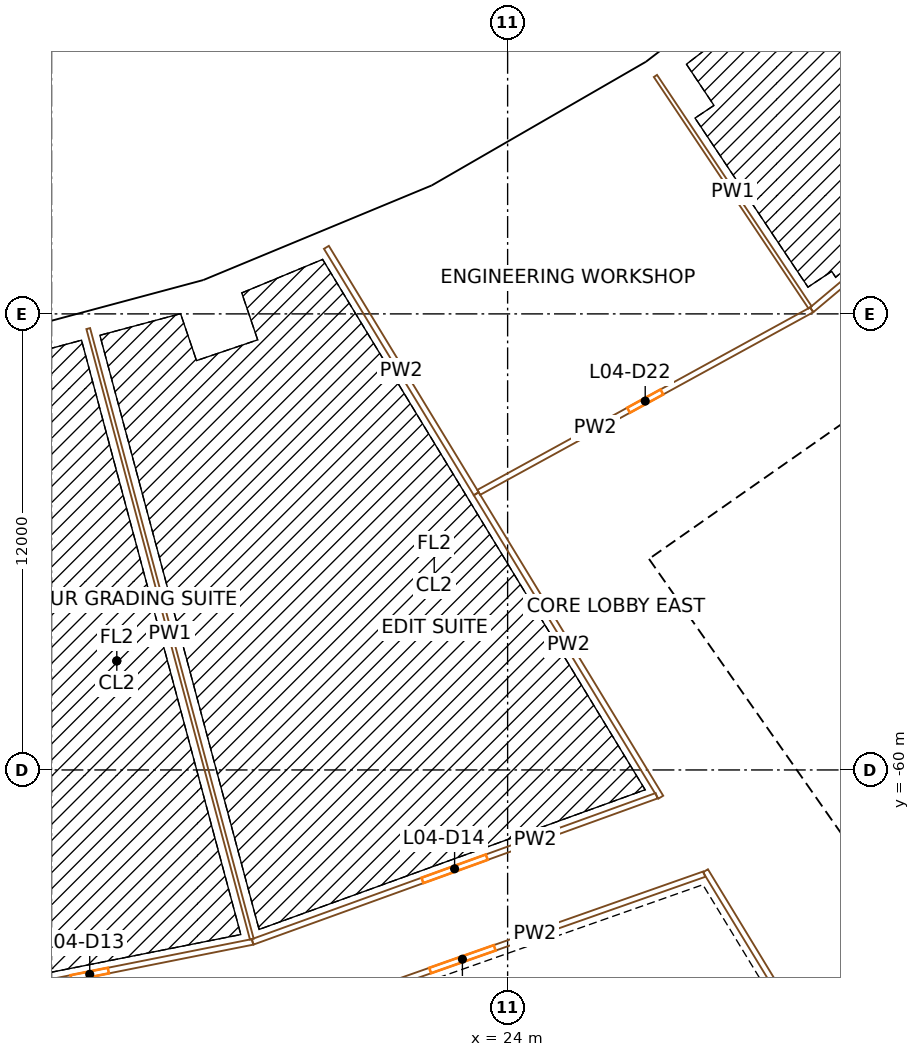
"""IFC4 building model, lengths in metres.
Left out: names, types, materials, properties, quantities, classifications, styles, units other than length and angle.
Written with IfcOpenShell. Run it as: python <this file> out.ifc"""

import sys

from ifc_helpers import new_model, si_unit, direction, frame, frame_2d, origin, origin_2d, place, context, subcontext, project, spatial, rectangle, extrude, element, fill, save


model = new_model("IFC4")
c1 = context("Model", 3, precision=1e-05, world=origin(), true_north=direction((0.0, 1.0)))
c2 = subcontext(c1, "Body", "Model", "MODEL_VIEW")
j1 = project(units=[si_unit("LENGTHUNIT", "METRE"), si_unit("PLANEANGLEUNIT", "RADIAN")], contexts=[c1])
p1 = place(None, origin())
s1 = spatial("IfcSite", under=j1, at=p1, CompositionType="ELEMENT")
p2 = place(p1, origin())
s2 = spatial("IfcBuilding", under=s1, at=p2, CompositionType="ELEMENT")
p3 = place(p2, frame((0.0, 0.0, 31.5)))
s3 = spatial("IfcBuildingStorey", under=s2, at=p3, CompositionType="ELEMENT", Elevation=31.5)
p4 = place(p3, frame((11.364, -57.131, 0.0), z_axis=(0.0, 0.0, 1.0), x_axis=(0.980785280403, 0.195090322016, 0.0)))
e1 = element("IfcColumn", 1, at=p4, inside=s3, PredefinedType="COLUMN", context=c2, shape_type="SweptSolid", body=[
    extrude(rectangle(XDim=1.4, YDim=1.8, at=origin_2d()), origin(), (0.0, 0.0, 1.0), 4.5),
])
p5 = place(p3, frame((16.313, -48.057, 0.0), z_axis=(0.0, 0.0, 1.0), x_axis=(0.946930129495, 0.321439465303, 0.0)))
e2 = element("IfcColumn", 2, at=p5, inside=s3, PredefinedType="COLUMN", context=c2, shape_type="SweptSolid", body=[
    extrude(rectangle(XDim=1.1, YDim=1.3, at=origin_2d()), origin(), (0.0, 0.0, 1.0), 4.5),
])
p6 = place(p3, frame((18.724, -55.159, 0.0), z_axis=(0.0, 0.0, 1.0), x_axis=(0.946930129495, 0.321439465303, 0.0)))
e3 = element("IfcColumn", 3, at=p6, inside=s3, PredefinedType="COLUMN", context=c2, shape_type="SweptSolid", body=[
    extrude(rectangle(XDim=1.4, YDim=1.8, at=origin_2d()), origin(), (0.0, 0.0, 1.0), 4.5),
])
p7 = place(p3, frame((22.446, -45.516, 0.0), z_axis=(0.0, 0.0, 1.0), x_axis=(0.896872741533, 0.442288690219, 0.0)))
e4 = element("IfcColumn", 4, at=p7, inside=s3, PredefinedType="COLUMN", context=c2, shape_type="SweptSolid", body=[
    extrude(rectangle(XDim=1.1, YDim=1.3, at=origin_2d()), origin(), (0.0, 0.0, 1.0), 4.5),
])
p8 = place(p3, frame((25.763, -52.243, 0.0), z_axis=(0.0, 0.0, 1.0), x_axis=(0.896872741533, 0.442288690219, 0.0)))
e5 = element("IfcColumn", 5, at=p8, inside=s3, PredefinedType="COLUMN", context=c2, shape_type="SweptSolid", body=[
    extrude(rectangle(XDim=1.4, YDim=1.8, at=origin_2d()), origin(), (0.0, 0.0, 1.0), 4.5),
])
p9 = place(p3, frame((28.195, -42.197, 0.0), z_axis=(0.0, 0.0, 1.0), x_axis=(0.831469612303, 0.55557023302, 0.0)))
e6 = element("IfcColumn", 6, at=p9, inside=s3, PredefinedType="COLUMN", context=c2, shape_type="SweptSolid", body=[
    extrude(rectangle(XDim=1.1, YDim=1.3, at=origin_2d()), origin(), (0.0, 0.0, 1.0), 4.5),
])
p10 = place(p3, frame((32.362, -48.433, 0.0), z_axis=(0.0, 0.0, 1.0), x_axis=(0.831469612303, 0.55557023302, 0.0)))
e7 = element("IfcColumn", 7, at=p10, inside=s3, PredefinedType="COLUMN", context=c2, shape_type="SweptSolid", body=[
    extrude(rectangle(XDim=1.4, YDim=1.8, at=origin_2d()), origin(), (0.0, 0.0, 1.0), 4.5),
])
p11 = place(p3, frame((36.717, -66.337, 0.0), z_axis=(0.0, 0.0, 1.0), x_axis=(-0.573577477574, 0.819151315216, 0.0)))
e8 = element("IfcWall", 8, at=p11, inside=s3, PredefinedType="SHEAR", context=c2, shape_type="SweptSolid", body=[
    extrude(rectangle(XDim=14.8, YDim=0.9, at=frame_2d((7.4, 0.0))), origin(), (0.0, 0.0, 1.0), 4.1),
])
p12 = place(p11, frame((6.2, 0.0, 0.0)))
e9 = element("IfcOpeningElement", 9, at=p12, cuts=e8, PredefinedType="OPENING", context=c2, shape_type="SweptSolid", body=[
    extrude(rectangle(XDim=2.4, YDim=2.1, at=frame_2d((1.2, 1.05))), frame((0.0, 0.46, 0.0), z_axis=(0.0, -1.0, 0.0), x_axis=(1.0, 0.0, 0.0)), (0.0, 0.0, 1.0), 0.92),
])
p13 = place(p3, frame((28.854, -54.324, 0.0), z_axis=(0.0, 0.0, 1.0), x_axis=(0.819145767589, 0.573585400304, 0.0)))
e10 = element("IfcWall", 10, at=p13, inside=s3, PredefinedType="SHEAR", context=c2, shape_type="SweptSolid", body=[
    extrude(rectangle(XDim=15.045, YDim=0.9, at=frame_2d((7.523, 0.0))), origin(), (0.0, 0.0, 1.0), 4.1),
])
p14 = place(p13, frame((1.05, 0.0, 0.0)))
e11 = element("IfcOpeningElement", 11, at=p14, cuts=e10, PredefinedType="OPENING", context=c2, shape_type="SweptSolid", body=[
    extrude(rectangle(XDim=0.9, YDim=2.1, at=frame_2d((0.45, 1.05))), frame((0.0, 0.46, 0.0), z_axis=(0.0, -1.0, 0.0), x_axis=(1.0, 0.0, 0.0)), (0.0, 0.0, 1.0), 0.92),
])
p15 = place(p13, frame((3.775, 0.0, 0.0)))
e12 = element("IfcOpeningElement", 12, at=p15, cuts=e10, PredefinedType="OPENING", context=c2, shape_type="SweptSolid", body=[
    extrude(rectangle(XDim=1.0, YDim=2.1, at=frame_2d((0.5, 1.05))), frame((0.0, 0.46, 0.0), z_axis=(0.0, -1.0, 0.0), x_axis=(1.0, 0.0, 0.0)), (0.0, 0.0, 1.0), 0.92),
])
p16 = place(p13, frame((6.275, 0.0, 0.0)))
e13 = element("IfcOpeningElement", 13, at=p16, cuts=e10, PredefinedType="OPENING", context=c2, shape_type="SweptSolid", body=[
    extrude(rectangle(XDim=1.0, YDim=2.1, at=frame_2d((0.5, 1.05))), frame((0.0, 0.46, 0.0), z_axis=(0.0, -1.0, 0.0), x_axis=(1.0, 0.0, 0.0)), (0.0, 0.0, 1.0), 0.92),
])
p17 = place(p13, frame((13.495, 0.0, 0.0)))
e14 = element("IfcOpeningElement", 14, at=p17, cuts=e10, PredefinedType="OPENING", context=c2, shape_type="SweptSolid", body=[
    extrude(rectangle(XDim=1.1, YDim=2.1, at=frame_2d((0.55, 1.05))), frame((0.0, 0.46, 0.0), z_axis=(0.0, -1.0, 0.0), x_axis=(1.0, 0.0, 0.0)), (0.0, 0.0, 1.0), 0.92),
])
p18 = place(p3, frame((31.895, -58.666, 0.0), z_axis=(0.0, 0.0, 1.0), x_axis=(0.819166993208, 0.573555086491, 0.0)))
e15 = element("IfcWall", 15, at=p18, inside=s3, PredefinedType="SOLIDWALL", context=c2, shape_type="SweptSolid", body=[
    extrude(rectangle(XDim=7.95, YDim=0.3, at=frame_2d((3.975, 0.0))), origin(), (0.0, 0.0, 1.0), 4.1),
])
p19 = place(p18, frame((0.675, 0.0, 0.0)))
e16 = element("IfcOpeningElement", 16, at=p19, cuts=e15, PredefinedType="OPENING", context=c2, shape_type="SweptSolid", body=[
    extrude(rectangle(XDim=1.1, YDim=2.1, at=frame_2d((0.55, 1.05))), frame((0.0, 0.16, 0.0), z_axis=(0.0, -1.0, 0.0), x_axis=(1.0, 0.0, 0.0)), (0.0, 0.0, 1.0), 0.32),
])
p20 = place(p18, frame((3.425, 0.0, 0.0)))
e17 = element("IfcOpeningElement", 17, at=p20, cuts=e15, PredefinedType="OPENING", context=c2, shape_type="SweptSolid", body=[
    extrude(rectangle(XDim=1.1, YDim=2.1, at=frame_2d((0.55, 1.05))), frame((0.0, 0.16, 0.0), z_axis=(0.0, -1.0, 0.0), x_axis=(1.0, 0.0, 0.0)), (0.0, 0.0, 1.0), 0.32),
])
p21 = place(p18, frame((6.175, 0.0, 0.0)))
e18 = element("IfcOpeningElement", 18, at=p21, cuts=e15, PredefinedType="OPENING", context=c2, shape_type="SweptSolid", body=[
    extrude(rectangle(XDim=1.1, YDim=2.1, at=frame_2d((0.55, 1.05))), frame((0.0, 0.16, 0.0), z_axis=(0.0, -1.0, 0.0), x_axis=(1.0, 0.0, 0.0)), (0.0, 0.0, 1.0), 0.32),
])
p22 = place(p3, frame((30.461, -56.618, 0.0), z_axis=(0.0, 0.0, 1.0), x_axis=(0.819142461705, 0.573590121456, 0.0)))
e19 = element("IfcWall", 19, at=p22, inside=s3, PredefinedType="SOLIDWALL", context=c2, shape_type="SweptSolid", body=[
    extrude(rectangle(XDim=7.95, YDim=0.3, at=frame_2d((3.975, 0.0))), origin(), (0.0, 0.0, 1.0), 4.1),
])
p23 = place(p3, frame((33.938, -57.052, 0.0), z_axis=(0.0, 0.0, 1.0), x_axis=(-0.573581496053, 0.819148501424, 0.0)))
e20 = element("IfcWall", 20, at=p23, inside=s3, PredefinedType="SOLIDWALL", context=c2, shape_type="SweptSolid", body=[
    extrude(rectangle(XDim=2.2, YDim=0.3, at=frame_2d((1.1, 0.0))), origin(), (0.0, 0.0, 1.0), 4.1),
])
p24 = place(p3, frame((32.914, -54.717, 0.0), z_axis=(0.0, 0.0, 1.0), x_axis=(-0.573581496053, 0.819148501424, 0.0)))
e21 = element("IfcWall", 21, at=p24, inside=s3, PredefinedType="PARTITIONING", context=c2, shape_type="SweptSolid", body=[
    extrude(rectangle(XDim=2.2, YDim=0.15, at=frame_2d((1.1, 0.0))), origin(), (0.0, 0.0, 1.0), 4.1),
])
p25 = place(p3, frame((16.007, -47.339, 0.0), z_axis=(0.0, 0.0, 1.0), x_axis=(-0.965926830738, -0.25881529642, 0.0)))
e22 = element("IfcWall", 22, at=p25, inside=s3, PredefinedType="SOLIDWALL", context=c2, shape_type="SweptSolid", body=[
    extrude(rectangle(XDim=6.419, YDim=0.45, at=frame_2d((3.209, 0.0))), origin(), (0.0, 0.0, 1.0), 3.2),
])
p26 = place(p25, frame((3.66, 0.0, 0.9)))
e23 = element("IfcOpeningElement", 23, at=p26, cuts=e22, PredefinedType="OPENING", context=c2, shape_type="SweptSolid", body=[
    extrude(rectangle(XDim=1.2, YDim=2.15, at=frame_2d((0.6, 1.075))), frame((0.0, 0.235, 0.0), z_axis=(0.0, -1.0, 0.0), x_axis=(1.0, 0.0, 0.0)), (0.0, 0.0, 1.0), 0.47),
])
p27 = place(p25, frame((1.56, 0.0, 0.9)))
e24 = element("IfcOpeningElement", 24, at=p27, cuts=e22, PredefinedType="OPENING", context=c2, shape_type="SweptSolid", body=[
    extrude(rectangle(XDim=1.2, YDim=2.15, at=frame_2d((0.6, 1.075))), frame((0.0, 0.235, 0.0), z_axis=(0.0, -1.0, 0.0), x_axis=(1.0, 0.0, 0.0)), (0.0, 0.0, 1.0), 0.47),
])
p28 = place(p3, frame((22.131, -44.81, 0.0), z_axis=(0.0, 0.0, 1.0), x_axis=(-0.923877459804, -0.382688436284, 0.0)))
e25 = element("IfcWall", 25, at=p28, inside=s3, PredefinedType="SOLIDWALL", context=c2, shape_type="SweptSolid", body=[
    extrude(rectangle(XDim=6.597, YDim=0.45, at=frame_2d((3.299, 0.0))), origin(), (0.0, 0.0, 1.0), 3.2),
])
p29 = place(p28, frame((3.749, 0.0, 0.9)))
e26 = element("IfcOpeningElement", 26, at=p29, cuts=e25, PredefinedType="OPENING", context=c2, shape_type="SweptSolid", body=[
    extrude(rectangle(XDim=1.2, YDim=2.15, at=frame_2d((0.6, 1.075))), frame((0.0, 0.235, 0.0), z_axis=(0.0, -1.0, 0.0), x_axis=(1.0, 0.0, 0.0)), (0.0, 0.0, 1.0), 0.47),
])
p30 = place(p28, frame((1.648, 0.0, 0.9)))
e27 = element("IfcOpeningElement", 27, at=p30, cuts=e25, PredefinedType="OPENING", context=c2, shape_type="SweptSolid", body=[
    extrude(rectangle(XDim=1.2, YDim=2.15, at=frame_2d((0.6, 1.075))), frame((0.0, 0.235, 0.0), z_axis=(0.0, -1.0, 0.0), x_axis=(1.0, 0.0, 0.0)), (0.0, 0.0, 1.0), 0.47),
])
p31 = place(p3, frame((27.714, -41.583, 0.0), z_axis=(0.0, 0.0, 1.0), x_axis=(-0.866022817921, -0.50000447882, 0.0)))
e28 = element("IfcWall", 28, at=p31, inside=s3, PredefinedType="SOLIDWALL", context=c2, shape_type="SweptSolid", body=[
    extrude(rectangle(XDim=6.419, YDim=0.45, at=frame_2d((3.21, 0.0))), origin(), (0.0, 0.0, 1.0), 3.2),
])
p32 = place(p31, frame((3.66, 0.0, 0.9)))
e29 = element("IfcOpeningElement", 29, at=p32, cuts=e28, PredefinedType="OPENING", context=c2, shape_type="SweptSolid", body=[
    extrude(rectangle(XDim=1.2, YDim=2.15, at=frame_2d((0.6, 1.075))), frame((0.0, 0.235, 0.0), z_axis=(0.0, -1.0, 0.0), x_axis=(1.0, 0.0, 0.0)), (0.0, 0.0, 1.0), 0.47),
])
p33 = place(p31, frame((1.56, 0.0, 0.9)))
e30 = element("IfcOpeningElement", 30, at=p33, cuts=e28, PredefinedType="OPENING", context=c2, shape_type="SweptSolid", body=[
    extrude(rectangle(XDim=1.2, YDim=2.15, at=frame_2d((0.6, 1.075))), frame((0.0, 0.235, 0.0), z_axis=(0.0, -1.0, 0.0), x_axis=(1.0, 0.0, 0.0)), (0.0, 0.0, 1.0), 0.47),
])
p34 = place(p3, frame((32.975, -37.555, 0.0), z_axis=(0.0, 0.0, 1.0), x_axis=(-0.793338838284, -0.608780327927, 0.0)))
e31 = element("IfcWall", 31, at=p34, inside=s3, PredefinedType="SOLIDWALL", context=c2, shape_type="SweptSolid", body=[
    extrude(rectangle(XDim=6.597, YDim=0.45, at=frame_2d((3.298, 0.0))), origin(), (0.0, 0.0, 1.0), 3.2),
])
p35 = place(p34, frame((3.749, 0.0, 0.9)))
e32 = element("IfcOpeningElement", 32, at=p35, cuts=e31, PredefinedType="OPENING", context=c2, shape_type="SweptSolid", body=[
    extrude(rectangle(XDim=1.2, YDim=2.15, at=frame_2d((0.6, 1.075))), frame((0.0, 0.235, 0.0), z_axis=(0.0, -1.0, 0.0), x_axis=(1.0, 0.0, 0.0)), (0.0, 0.0, 1.0), 0.47),
])
p36 = place(p34, frame((1.648, 0.0, 0.9)))
e33 = element("IfcOpeningElement", 33, at=p36, cuts=e31, PredefinedType="OPENING", context=c2, shape_type="SweptSolid", body=[
    extrude(rectangle(XDim=1.2, YDim=2.15, at=frame_2d((0.6, 1.075))), frame((0.0, 0.235, 0.0), z_axis=(0.0, -1.0, 0.0), x_axis=(1.0, 0.0, 0.0)), (0.0, 0.0, 1.0), 0.47),
])
p37 = place(p3, frame((8.719, -66.229, 0.0), z_axis=(0.0, 0.0, 1.0), x_axis=(0.980786466832, 0.195084357342, 0.0)))
e34 = element("IfcWall", 34, at=p37, inside=s3, PredefinedType="PARTITIONING", context=c2, shape_type="SweptSolid", body=[
    extrude(rectangle(XDim=8.738, YDim=0.15, at=frame_2d((4.369, 0.0))), origin(), (0.0, 0.0, 1.0), 3.1),
])
p38 = place(p37, frame((3.869, 0.0, 0.0)))
e35 = element("IfcOpeningElement", 35, at=p38, cuts=e34, PredefinedType="OPENING", context=c2, shape_type="SweptSolid", body=[
    extrude(rectangle(XDim=1.0, YDim=2.1, at=frame_2d((0.5, 1.05))), frame((0.0, 0.085, 0.0), z_axis=(0.0, -1.0, 0.0), x_axis=(1.0, 0.0, 0.0)), (0.0, 0.0, 1.0), 0.17),
])
p39 = place(p3, frame((12.965, -48.386, 0.0), z_axis=(0.0, 0.0, 1.0), x_axis=(0.258824622624, -0.965924331779, 0.0)))
e36 = element("IfcWall", 36, at=p39, inside=s3, PredefinedType="PARTITIONING", context=c2, shape_type="SweptSolid", body=[
    extrude(rectangle(XDim=16.632, YDim=0.1, at=frame_2d((8.316, 0.0))), origin(), (0.0, 0.0, 1.0), 3.1),
])
p40 = place(p3, frame((29.175, -62.741, 0.0), z_axis=(0.0, 0.0, 1.0), x_axis=(-0.94336986797, -0.33174281033, 0.0)))
e37 = element("IfcWall", 37, at=p40, inside=s3, PredefinedType="PARTITIONING", context=c2, shape_type="SweptSolid", body=[
    extrude(rectangle(XDim=13.493, YDim=0.15, at=frame_2d((6.746, 0.0))), origin(), (0.0, 0.0, 1.0), 3.1),
])
p41 = place(p40, frame((5.846, 0.0, 0.0)))
e38 = element("IfcOpeningElement", 38, at=p41, cuts=e37, PredefinedType="OPENING", context=c2, shape_type="SweptSolid", body=[
    extrude(rectangle(XDim=1.8, YDim=2.1, at=frame_2d((0.9, 1.05))), frame((0.0, 0.085, 0.0), z_axis=(0.0, -1.0, 0.0), x_axis=(1.0, 0.0, 0.0)), (0.0, 0.0, 1.0), 0.17),
])
p42 = place(p3, frame((17.289, -64.524, 0.0), z_axis=(0.0, 0.0, 1.0), x_axis=(0.940369024046, 0.340155991589, 0.0)))
e39 = element("IfcWall", 39, at=p42, inside=s3, PredefinedType="PARTITIONING", context=c2, shape_type="SweptSolid", body=[
    extrude(rectangle(XDim=11.305, YDim=0.15, at=frame_2d((5.652, 0.0))), origin(), (0.0, 0.0, 1.0), 3.1),
])
p43 = place(p42, frame((4.752, 0.0, 0.0)))
e40 = element("IfcOpeningElement", 40, at=p43, cuts=e39, PredefinedType="OPENING", context=c2, shape_type="SweptSolid", body=[
    extrude(rectangle(XDim=1.8, YDim=2.1, at=frame_2d((0.9, 1.05))), frame((0.0, 0.085, 0.0), z_axis=(0.0, -1.0, 0.0), x_axis=(1.0, 0.0, 0.0)), (0.0, 0.0, 1.0), 0.17),
])
p44 = place(p3, frame((19.231, -46.249, 0.0), z_axis=(0.0, 0.0, 1.0), x_axis=(0.519582509181, -0.854420280748, 0.0)))
e41 = element("IfcWall", 41, at=p44, inside=s3, PredefinedType="PARTITIONING", context=c2, shape_type="SweptSolid", body=[
    extrude(rectangle(XDim=7.588, YDim=0.15, at=frame_2d((3.794, 0.0))), origin(), (0.0, 0.0, 1.0), 3.1),
])
p45 = place(p3, frame((23.174, -52.732, 0.0), z_axis=(0.0, 0.0, 1.0), x_axis=(0.519577254173, -0.854423476355, 0.0)))
e42 = element("IfcWall", 42, at=p45, inside=s3, PredefinedType="PARTITIONING", context=c2, shape_type="SweptSolid", body=[
    extrude(rectangle(XDim=9.345, YDim=0.15, at=frame_2d((4.672, 0.0))), origin(), (0.0, 0.0, 1.0), 3.1),
])
p46 = place(p3, frame((23.24, -52.697, 0.0), z_axis=(0.0, 0.0, 1.0), x_axis=(0.876826033283, 0.480807765492, 0.0)))
e43 = element("IfcWall", 43, at=p46, inside=s3, PredefinedType="PARTITIONING", context=c2, shape_type="SweptSolid", body=[
    extrude(rectangle(XDim=9.991, YDim=0.15, at=frame_2d((4.996, 0.0))), origin(), (0.0, 0.0, 1.0), 3.1),
])
p47 = place(p46, frame((4.496, 0.0, 0.0)))
e44 = element("IfcOpeningElement", 44, at=p47, cuts=e43, PredefinedType="OPENING", context=c2, shape_type="SweptSolid", body=[
    extrude(rectangle(XDim=1.0, YDim=2.1, at=frame_2d((0.5, 1.05))), frame((0.0, 0.085, 0.0), z_axis=(0.0, -1.0, 0.0), x_axis=(1.0, 0.0, 0.0)), (0.0, 0.0, 1.0), 0.17),
])
p48 = place(p3, frame((27.89, -41.74, 0.0), z_axis=(0.0, 0.0, 1.0), x_axis=(0.555569023768, -0.831470420297, 0.0)))
e45 = element("IfcWall", 45, at=p48, inside=s3, PredefinedType="PARTITIONING", context=c2, shape_type="SweptSolid", body=[
    extrude(rectangle(XDim=7.325, YDim=0.1, at=frame_2d((3.663, 0.0))), origin(), (0.0, 0.0, 1.0), 3.1),
])
p49 = place(p3, frame((29.207, -62.652, 0.0), z_axis=(0.0, 0.0, 1.0), x_axis=(0.519573423316, -0.854425805897, 0.0)))
e46 = element("IfcWall", 46, at=p49, inside=s3, PredefinedType="PARTITIONING", context=c2, shape_type="SweptSolid", body=[
    extrude(rectangle(XDim=9.726, YDim=0.15, at=frame_2d((4.863, 0.0))), origin(), (0.0, 0.0, 1.0), 3.1),
])
p50 = place(p3, frame((32.001, -47.893, 0.0), z_axis=(0.0, 0.0, 1.0), x_axis=(0.765734049768, 0.643157340801, 0.0)))
e47 = element("IfcWall", 47, at=p50, inside=s3, PredefinedType="PARTITIONING", context=c2, shape_type="SweptSolid", body=[
    extrude(rectangle(XDim=12.524, YDim=0.15, at=frame_2d((6.262, 0.0))), origin(), (0.0, 0.0, 1.0), 3.1),
])
p51 = place(p50, frame((5.762, 0.0, 0.0)))
e48 = element("IfcOpeningElement", 48, at=p51, cuts=e47, PredefinedType="OPENING", context=c2, shape_type="SweptSolid", body=[
    extrude(rectangle(XDim=1.0, YDim=2.1, at=frame_2d((0.5, 1.05))), frame((0.0, 0.085, 0.0), z_axis=(0.0, -1.0, 0.0), x_axis=(1.0, 0.0, 0.0)), (0.0, 0.0, 1.0), 0.17),
])
p52 = place(p12, origin())
e49 = element("IfcDoor", 49, at=p52, inside=s3, OperationType="DOUBLE_DOOR_SINGLE_SWING", PredefinedType="DOOR", context=c2, shape_type="SweptSolid", body=[
    extrude(rectangle(XDim=2.4, YDim=2.1, at=frame_2d((1.2, 1.05))), frame((0.0, 0.025, 0.0), z_axis=(0.0, -1.0, 0.0), x_axis=(1.0, 0.0, 0.0)), (0.0, 0.0, 1.0), 0.05),
])
fill(e9, e49)
p53 = place(p19, origin())
e50 = element("IfcDoor", 50, at=p53, inside=s3, OperationType="DOUBLE_DOOR_SLIDING", PredefinedType="DOOR", context=c2, shape_type="SweptSolid", body=[
    extrude(rectangle(XDim=1.1, YDim=2.1, at=frame_2d((0.55, 1.05))), frame((0.0, 0.025, 0.0), z_axis=(0.0, -1.0, 0.0), x_axis=(1.0, 0.0, 0.0)), (0.0, 0.0, 1.0), 0.05),
])
fill(e16, e50)
p54 = place(p14, origin())
e51 = element("IfcDoor", 51, at=p54, inside=s3, OperationType="SINGLE_SWING_LEFT", PredefinedType="DOOR", context=c2, shape_type="SweptSolid", body=[
    extrude(rectangle(XDim=0.9, YDim=2.1, at=frame_2d((0.45, 1.05))), frame((0.0, 0.025, 0.0), z_axis=(0.0, -1.0, 0.0), x_axis=(1.0, 0.0, 0.0)), (0.0, 0.0, 1.0), 0.05),
])
fill(e11, e51)
p55 = place(p15, origin())
e52 = element("IfcDoor", 52, at=p55, inside=s3, OperationType="SINGLE_SWING_RIGHT", PredefinedType="DOOR", context=c2, shape_type="SweptSolid", body=[
    extrude(rectangle(XDim=1.0, YDim=2.1, at=frame_2d((0.5, 1.05))), frame((0.0, 0.025, 0.0), z_axis=(0.0, -1.0, 0.0), x_axis=(1.0, 0.0, 0.0)), (0.0, 0.0, 1.0), 0.05),
])
fill(e12, e52)
p56 = place(p26, origin())
e53 = element("IfcWindow", 53, at=p56, inside=s3, PartitioningType="SINGLE_PANEL", PredefinedType="WINDOW", context=c2, shape_type="SweptSolid", body=[
    extrude(rectangle(XDim=1.2, YDim=2.15, at=frame_2d((0.6, 1.075))), frame((0.0, 0.03, 0.0), z_axis=(0.0, -1.0, 0.0), x_axis=(1.0, 0.0, 0.0)), (0.0, 0.0, 1.0), 0.06),
])
fill(e23, e53)
p57 = place(p27, origin())
e54 = element("IfcWindow", 54, at=p57, inside=s3, PartitioningType="SINGLE_PANEL", PredefinedType="WINDOW", context=c2, shape_type="SweptSolid", body=[
    extrude(rectangle(XDim=1.2, YDim=2.15, at=frame_2d((0.6, 1.075))), frame((0.0, 0.03, 0.0), z_axis=(0.0, -1.0, 0.0), x_axis=(1.0, 0.0, 0.0)), (0.0, 0.0, 1.0), 0.06),
])
fill(e24, e54)
p58 = place(p29, origin())
e55 = element("IfcWindow", 55, at=p58, inside=s3, PartitioningType="SINGLE_PANEL", PredefinedType="WINDOW", context=c2, shape_type="SweptSolid", body=[
    extrude(rectangle(XDim=1.2, YDim=2.15, at=frame_2d((0.6, 1.075))), frame((0.0, 0.03, 0.0), z_axis=(0.0, -1.0, 0.0), x_axis=(1.0, 0.0, 0.0)), (0.0, 0.0, 1.0), 0.06),
])
fill(e26, e55)
p59 = place(p30, origin())
e56 = element("IfcWindow", 56, at=p59, inside=s3, PartitioningType="SINGLE_PANEL", PredefinedType="WINDOW", context=c2, shape_type="SweptSolid", body=[
    extrude(rectangle(XDim=1.2, YDim=2.15, at=frame_2d((0.6, 1.075))), frame((0.0, 0.03, 0.0), z_axis=(0.0, -1.0, 0.0), x_axis=(1.0, 0.0, 0.0)), (0.0, 0.0, 1.0), 0.06),
])
fill(e27, e56)
p60 = place(p32, origin())
e57 = element("IfcWindow", 57, at=p60, inside=s3, PartitioningType="SINGLE_PANEL", PredefinedType="WINDOW", context=c2, shape_type="SweptSolid", body=[
    extrude(rectangle(XDim=1.2, YDim=2.15, at=frame_2d((0.6, 1.075))), frame((0.0, 0.03, 0.0), z_axis=(0.0, -1.0, 0.0), x_axis=(1.0, 0.0, 0.0)), (0.0, 0.0, 1.0), 0.06),
])
fill(e29, e57)
p61 = place(p33, origin())
e58 = element("IfcWindow", 58, at=p61, inside=s3, PartitioningType="SINGLE_PANEL", PredefinedType="WINDOW", context=c2, shape_type="SweptSolid", body=[
    extrude(rectangle(XDim=1.2, YDim=2.15, at=frame_2d((0.6, 1.075))), frame((0.0, 0.03, 0.0), z_axis=(0.0, -1.0, 0.0), x_axis=(1.0, 0.0, 0.0)), (0.0, 0.0, 1.0), 0.06),
])
fill(e30, e58)
p62 = place(p41, origin())
e59 = element("IfcDoor", 59, at=p62, inside=s3, OperationType="DOUBLE_DOOR_SINGLE_SWING", PredefinedType="DOOR", context=c2, shape_type="SweptSolid", body=[
    extrude(rectangle(XDim=1.8, YDim=2.1, at=frame_2d((0.9, 1.05))), frame((0.0, 0.025, 0.0), z_axis=(0.0, -1.0, 0.0), x_axis=(1.0, 0.0, 0.0)), (0.0, 0.0, 1.0), 0.05),
])
fill(e38, e59)
p63 = place(p38, origin())
e60 = element("IfcDoor", 60, at=p63, inside=s3, OperationType="SINGLE_SWING_RIGHT", PredefinedType="DOOR", context=c2, shape_type="SweptSolid", body=[
    extrude(rectangle(XDim=1.0, YDim=2.1, at=frame_2d((0.5, 1.05))), frame((0.0, 0.025, 0.0), z_axis=(0.0, -1.0, 0.0), x_axis=(1.0, 0.0, 0.0)), (0.0, 0.0, 1.0), 0.05),
])
fill(e35, e60)
p64 = place(p43, origin())
e61 = element("IfcDoor", 61, at=p64, inside=s3, OperationType="DOUBLE_DOOR_SINGLE_SWING", PredefinedType="DOOR", context=c2, shape_type="SweptSolid", body=[
    extrude(rectangle(XDim=1.8, YDim=2.1, at=frame_2d((0.9, 1.05))), frame((0.0, 0.025, 0.0), z_axis=(0.0, -1.0, 0.0), x_axis=(1.0, 0.0, 0.0)), (0.0, 0.0, 1.0), 0.05),
])
fill(e40, e61)
p65 = place(p47, origin())
e62 = element("IfcDoor", 62, at=p65, inside=s3, OperationType="SINGLE_SWING_RIGHT", PredefinedType="DOOR", context=c2, shape_type="SweptSolid", body=[
    extrude(rectangle(XDim=1.0, YDim=2.1, at=frame_2d((0.5, 1.05))), frame((0.0, 0.025, 0.0), z_axis=(0.0, -1.0, 0.0), x_axis=(1.0, 0.0, 0.0)), (0.0, 0.0, 1.0), 0.05),
])
fill(e44, e62)
save(model, sys.argv[1])
